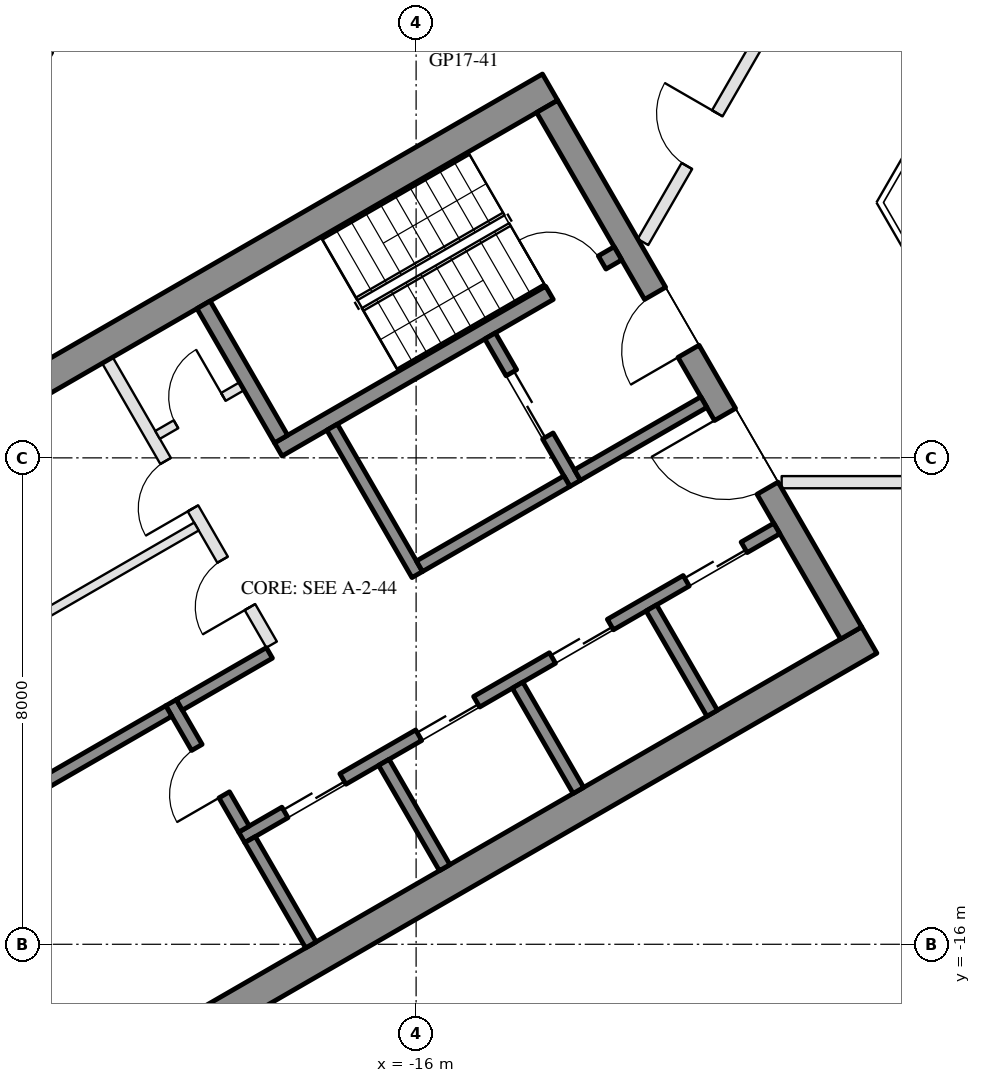
"""IFC4 building model, lengths in metres.
Left out: names, types, materials, properties, quantities, classifications, styles, units other than length and angle.
Written with IfcOpenShell. Run it as: python <this file> out.ifc"""

import sys

from ifc_helpers import new_model, si_unit, direction, frame, frame_2d, origin, place, context, subcontext, project, spatial, rectangle, extrude, element, fill, save


model = new_model("IFC4")
c1 = context("Model", 3, precision=1e-05, world=origin(), true_north=direction((0.0, 1.0)))
c2 = subcontext(c1, "Body", "Model", "MODEL_VIEW")
j1 = project(units=[si_unit("LENGTHUNIT", "METRE"), si_unit("PLANEANGLEUNIT", "RADIAN")], contexts=[c1])
p1 = place(None, origin())
s1 = spatial("IfcSite", under=j1, at=p1, CompositionType="ELEMENT")
p2 = place(p1, origin())
s2 = spatial("IfcBuilding", under=s1, at=p2, CompositionType="ELEMENT")
p3 = place(p2, frame((0.0, 0.0, 187.3)))
s3 = spatial("IfcBuildingStorey", under=s2, at=p3, CompositionType="ELEMENT", Elevation=187.3)
p4 = place(p3, frame((-20.309, 1.934, 0.0), z_axis=(0.0, 0.0, 1.0), x_axis=(-0.499992114976, -0.866029956157, 0.0)))
e1 = element("IfcWall", 1, at=p4, inside=s3, PredefinedType="SOLIDWALL", context=c2, shape_type="SweptSolid", body=[
    extrude(rectangle(XDim=6.74, YDim=0.35, at=frame_2d((3.37, 0.0))), origin(), (0.0, 0.0, 1.0), 3.55),
])
p5 = place(p4, frame((4.02, 0.0, 0.0)))
e2 = element("IfcOpeningElement", 2, at=p5, cuts=e1, PredefinedType="OPENING", context=c2, shape_type="SweptSolid", body=[
    extrude(rectangle(XDim=2.4, YDim=2.4, at=frame_2d((1.2, 1.2))), frame((0.0, 0.185, 0.0), z_axis=(0.0, -1.0, 0.0), x_axis=(1.0, 0.0, 0.0)), (0.0, 0.0, 1.0), 0.37),
])
p6 = place(p4, frame((0.77, 0.0, 0.3)))
e3 = element("IfcOpeningElement", 3, at=p6, cuts=e1, PredefinedType="OPENING", context=c2, shape_type="SweptSolid", body=[
    extrude(rectangle(XDim=2.9, YDim=2.65, at=frame_2d((1.45, 1.325))), frame((0.0, 0.185, 0.0), z_axis=(0.0, -1.0, 0.0), x_axis=(1.0, 0.0, 0.0)), (0.0, 0.0, 1.0), 0.37),
])
for number, where, z_axis, x_axis in (
    (4, (-13.797, -1.903, 0.0), (0.0, 0.0, 1.0), (-0.866, -0.5, 0.0)),
    (5, (-8.547, -10.997, 0.0), (0.0, 0.0, 1.0), (-0.866, -0.5, 0.0)),
):
    element("IfcWall", number, at=place(p3, frame(where, z_axis=z_axis, x_axis=x_axis)), inside=s3, PredefinedType="SHEAR", context=c2, shape_type="SweptSolid", body=[
        extrude(rectangle(XDim=14.837, YDim=0.5, at=frame_2d((7.418, 0.0))), origin(), (0.0, 0.0, 1.0), 3.5),
    ])
p7 = place(p3, frame((-13.845, -2.22, 0.0), z_axis=(0.0, 0.0, 1.0), x_axis=(0.500004234368, -0.866022959057, 0.0)))
e6 = element("IfcWall", 6, at=p7, inside=s3, PredefinedType="SHEAR", context=c2, shape_type="SweptSolid", body=[
    extrude(rectangle(XDim=10.0, YDim=0.4, at=frame_2d((5.0, 0.0))), origin(), (0.0, 0.0, 1.0), 3.5),
])
p8 = place(p7, frame((3.55, 0.0, 0.0)))
e7 = element("IfcOpeningElement", 7, at=p8, cuts=e6, PredefinedType="OPENING", context=c2, shape_type="SweptSolid", body=[
    extrude(rectangle(XDim=1.1, YDim=2.1, at=frame_2d((0.55, 1.05))), frame((0.0, 0.21, 0.0), z_axis=(0.0, -1.0, 0.0), x_axis=(1.0, 0.0, 0.0)), (0.0, 0.0, 1.0), 0.42),
])
p9 = place(p7, frame((5.85, 0.0, 0.0)))
e8 = element("IfcOpeningElement", 8, at=p9, cuts=e6, PredefinedType="OPENING", context=c2, shape_type="SweptSolid", body=[
    extrude(rectangle(XDim=1.4, YDim=2.1, at=frame_2d((0.7, 1.05))), frame((0.0, 0.21, 0.0), z_axis=(0.0, -1.0, 0.0), x_axis=(1.0, 0.0, 0.0)), (0.0, 0.0, 1.0), 0.42),
])
p10 = place(p3, frame((-12.681, -4.636, 0.0), z_axis=(0.0, 0.0, 1.0), x_axis=(-0.866021702275, -0.500006411147, 0.0)))
e9 = element("IfcWall", 9, at=p10, inside=s3, PredefinedType="SHEAR", context=c2, shape_type="SweptSolid", body=[
    extrude(rectangle(XDim=6.45, YDim=0.25, at=frame_2d((3.225, 0.0))), origin(), (0.0, 0.0, 1.0), 3.5),
])
p11 = place(p10, frame((0.3, 0.0, 0.0)))
e10 = element("IfcOpeningElement", 10, at=p11, cuts=e9, PredefinedType="OPENING", context=c2, shape_type="SweptSolid", body=[
    extrude(rectangle(XDim=1.0, YDim=2.1, at=frame_2d((0.5, 1.05))), frame((0.0, 0.135, 0.0), z_axis=(0.0, -1.0, 0.0), x_axis=(1.0, 0.0, 0.0)), (0.0, 0.0, 1.0), 0.27),
])
p12 = place(p3, frame((-19.496, -5.482, 0.0), z_axis=(0.0, 0.0, 1.0), x_axis=(0.499990435942, -0.866030925526, 0.0)))
e11 = element("IfcWall", 11, at=p12, inside=s3, PredefinedType="SHEAR", context=c2, shape_type="SweptSolid", body=[
    extrude(rectangle(XDim=2.55, YDim=0.25, at=frame_2d((1.275, 0.0))), origin(), (0.0, 0.0, 1.0), 3.5),
])
p13 = place(p3, frame((-17.381, -7.495, 0.0), z_axis=(0.0, 0.0, 1.0), x_axis=(0.500011755427, -0.866018616679, 0.0)))
e12 = element("IfcWall", 12, at=p13, inside=s3, PredefinedType="SHEAR", context=c2, shape_type="SweptSolid", body=[
    extrude(rectangle(XDim=2.8, YDim=0.2, at=frame_2d((1.4, 0.0))), origin(), (0.0, 0.0, 1.0), 3.5),
])
p14 = place(p3, frame((-14.783, -5.995, 0.0), z_axis=(0.0, 0.0, 1.0), x_axis=(0.49994636267, -0.866056369097, 0.0)))
e13 = element("IfcWall", 13, at=p14, inside=s3, PredefinedType="SHEAR", context=c2, shape_type="SweptSolid", body=[
    extrude(rectangle(XDim=2.8, YDim=0.2, at=frame_2d((1.4, 0.0))), origin(), (0.0, 0.0, 1.0), 3.5),
])
p15 = place(p14, frame((0.7, 0.0, 0.0)))
e14 = element("IfcOpeningElement", 14, at=p15, cuts=e13, PredefinedType="OPENING", context=c2, shape_type="SweptSolid", body=[
    extrude(rectangle(XDim=1.2, YDim=2.1, at=frame_2d((0.6, 1.05))), frame((0.0, 0.11, 0.0), z_axis=(0.0, -1.0, 0.0), x_axis=(1.0, 0.0, 0.0)), (0.0, 0.0, 1.0), 0.22),
])
p16 = place(p3, frame((-13.52, -8.383, 0.0), z_axis=(0.0, 0.0, 1.0), x_axis=(-0.866034573852, -0.49998411664, 0.0)))
e15 = element("IfcWall", 15, at=p16, inside=s3, PredefinedType="SHEAR", context=c2, shape_type="SweptSolid", body=[
    extrude(rectangle(XDim=2.8, YDim=0.2, at=frame_2d((1.4, 0.0))), origin(), (0.0, 0.0, 1.0), 3.5),
])
p17 = place(p3, frame((-11.268, -7.083, 0.0), z_axis=(0.0, 0.0, 1.0), x_axis=(-0.866050077142, -0.499957262057, 0.0)))
e16 = element("IfcWall", 16, at=p17, inside=s3, PredefinedType="SHEAR", context=c2, shape_type="SweptSolid", body=[
    extrude(rectangle(XDim=2.4, YDim=0.2, at=frame_2d((1.2, 0.0))), origin(), (0.0, 0.0, 1.0), 3.5),
])
p18 = place(p3, frame((-10.068, -9.162, 0.0), z_axis=(0.0, 0.0, 1.0), x_axis=(-0.866032725843, -0.499987317609, 0.0)))
e17 = element("IfcWall", 17, at=p18, inside=s3, PredefinedType="SHEAR", context=c2, shape_type="SweptSolid", body=[
    extrude(rectangle(XDim=10.16, YDim=0.2, at=frame_2d((5.08, 0.0))), origin(), (0.0, 0.0, 1.0), 3.5),
])
p19 = place(p18, frame((0.62, 0.0, 0.0)))
e18 = element("IfcOpeningElement", 18, at=p19, cuts=e17, PredefinedType="OPENING", context=c2, shape_type="SweptSolid", body=[
    extrude(rectangle(XDim=1.1, YDim=2.1, at=frame_2d((0.55, 1.05))), frame((0.0, 0.11, 0.0), z_axis=(0.0, -1.0, 0.0), x_axis=(1.0, 0.0, 0.0)), (0.0, 0.0, 1.0), 0.22),
])
p20 = place(p18, frame((3.16, 0.0, 0.0)))
e19 = element("IfcOpeningElement", 19, at=p20, cuts=e17, PredefinedType="OPENING", context=c2, shape_type="SweptSolid", body=[
    extrude(rectangle(XDim=1.1, YDim=2.1, at=frame_2d((0.55, 1.05))), frame((0.0, 0.11, 0.0), z_axis=(0.0, -1.0, 0.0), x_axis=(1.0, 0.0, 0.0)), (0.0, 0.0, 1.0), 0.22),
])
p21 = place(p18, frame((5.7, 0.0, 0.0)))
e20 = element("IfcOpeningElement", 20, at=p21, cuts=e17, PredefinedType="OPENING", context=c2, shape_type="SweptSolid", body=[
    extrude(rectangle(XDim=1.1, YDim=2.1, at=frame_2d((0.55, 1.05))), frame((0.0, 0.11, 0.0), z_axis=(0.0, -1.0, 0.0), x_axis=(1.0, 0.0, 0.0)), (0.0, 0.0, 1.0), 0.22),
])
p22 = place(p18, frame((8.24, 0.0, 0.0)))
e21 = element("IfcOpeningElement", 21, at=p22, cuts=e17, PredefinedType="OPENING", context=c2, shape_type="SweptSolid", body=[
    extrude(rectangle(XDim=1.1, YDim=2.1, at=frame_2d((0.55, 1.05))), frame((0.0, 0.11, 0.0), z_axis=(0.0, -1.0, 0.0), x_axis=(1.0, 0.0, 0.0)), (0.0, 0.0, 1.0), 0.22),
])
p23 = place(p3, frame((-20.031, -12.026, 0.0), z_axis=(0.0, 0.0, 1.0), x_axis=(0.500033551112, -0.866006032174, 0.0)))
e22 = element("IfcWall", 22, at=p23, inside=s3, PredefinedType="SHEAR", context=c2, shape_type="SweptSolid", body=[
    extrude(rectangle(XDim=2.4, YDim=0.2, at=frame_2d((1.2, 0.0))), origin(), (0.0, 0.0, 1.0), 3.5),
])
p24 = place(p23, frame((0.85, 0.0, 0.0)))
e23 = element("IfcOpeningElement", 23, at=p24, cuts=e22, PredefinedType="OPENING", context=c2, shape_type="SweptSolid", body=[
    extrude(rectangle(XDim=0.9, YDim=2.1, at=frame_2d((0.45, 1.05))), frame((0.0, 0.11, 0.0), z_axis=(0.0, -1.0, 0.0), x_axis=(1.0, 0.0, 0.0)), (0.0, 0.0, 1.0), 0.22),
])
p25 = place(p3, frame((-18.413, -11.208, 0.0), z_axis=(0.0, 0.0, 1.0), x_axis=(-0.866038183914, -0.499977863513, 0.0)))
e24 = element("IfcWall", 24, at=p25, inside=s3, PredefinedType="SHEAR", context=c2, shape_type="SweptSolid", body=[
    extrude(rectangle(XDim=1.71, YDim=0.2, at=frame_2d((0.855, 0.0))), origin(), (0.0, 0.0, 1.0), 3.5),
])
for number, where, z_axis, x_axis in (
    (25, (-12.131, -10.468, 0.0), (0.0, 0.0, 1.0), (0.5, -0.866, 0.0)),
    (26, (-14.331, -11.738, 0.0), (0.0, 0.0, 1.0), (0.5, -0.866, 0.0)),
    (27, (-16.531, -13.008, 0.0), (0.0, 0.0, 1.0), (0.5, -0.866, 0.0)),
    (28, (-18.73, -14.278, 0.0), (0.0, 0.0, 1.0), (0.5, -0.866, 0.0)),
):
    element("IfcWall", number, at=place(p3, frame(where, z_axis=z_axis, x_axis=x_axis)), inside=s3, PredefinedType="SHEAR", context=c2, shape_type="SweptSolid", body=[
        extrude(rectangle(XDim=2.0, YDim=0.2, at=frame_2d((1.0, 0.0))), origin(), (0.0, 0.0, 1.0), 3.5),
    ])
p26 = place(p3, frame((-20.067, -12.163, 0.0), z_axis=(0.0, 0.0, 1.0), x_axis=(-0.866055327414, -0.49994816717, 0.0)))
e29 = element("IfcWall", 29, at=p26, inside=s3, PredefinedType="SHEAR", context=c2, shape_type="SweptSolid", body=[
    extrude(rectangle(XDim=2.84, YDim=0.2, at=frame_2d((1.42, 0.0))), origin(), (0.0, 0.0, 1.0), 3.5),
])
p27 = place(p3, frame((-21.076, -6.395, 0.0), z_axis=(0.0, 0.0, 1.0), x_axis=(0.50001468107, -0.866016927499, 0.0)))
e30 = element("IfcWall", 30, at=p27, inside=s3, PredefinedType="PARTITIONING", context=c2, shape_type="SweptSolid", body=[
    extrude(rectangle(XDim=5.4, YDim=0.2, at=frame_2d((2.7, 0.0))), origin(), (0.0, 0.0, 1.0), 3.5),
])
p28 = place(p27, frame((1.913, 0.0, 0.0)))
e31 = element("IfcOpeningElement", 31, at=p28, cuts=e30, PredefinedType="OPENING", context=c2, shape_type="SweptSolid", body=[
    extrude(rectangle(XDim=0.9, YDim=2.1, at=frame_2d((0.45, 1.05))), frame((0.0, 0.11, 0.0), z_axis=(0.0, -1.0, 0.0), x_axis=(1.0, 0.0, 0.0)), (0.0, 0.0, 1.0), 0.22),
])
p29 = place(p27, frame((3.788, 0.0, 0.0)))
e32 = element("IfcOpeningElement", 32, at=p29, cuts=e30, PredefinedType="OPENING", context=c2, shape_type="SweptSolid", body=[
    extrude(rectangle(XDim=0.9, YDim=2.1, at=frame_2d((0.45, 1.05))), frame((0.0, 0.11, 0.0), z_axis=(0.0, -1.0, 0.0), x_axis=(1.0, 0.0, 0.0)), (0.0, 0.0, 1.0), 0.22),
])
p30 = place(p3, frame((-18.866, -6.822, 0.0), z_axis=(0.0, 0.0, 1.0), x_axis=(-0.866028054938, -0.499995408039, 0.0)))
e33 = element("IfcWall", 33, at=p30, inside=s3, PredefinedType="PARTITIONING", context=c2, shape_type="SweptSolid", body=[
    extrude(rectangle(XDim=1.6, YDim=0.15, at=frame_2d((0.8, 0.0))), origin(), (0.0, 0.0, 1.0), 3.5),
])
p31 = place(p30, frame((0.35, 0.0, 0.0)))
e34 = element("IfcOpeningElement", 34, at=p31, cuts=e33, PredefinedType="OPENING", context=c2, shape_type="SweptSolid", body=[
    extrude(rectangle(XDim=0.9, YDim=2.1, at=frame_2d((0.45, 1.05))), frame((0.0, 0.085, 0.0), z_axis=(0.0, -1.0, 0.0), x_axis=(1.0, 0.0, 0.0)), (0.0, 0.0, 1.0), 0.17),
])
p32 = place(p3, frame((-19.613, -9.13, 0.0), z_axis=(0.0, 0.0, 1.0), x_axis=(-0.866031734426, -0.499989034847, 0.0)))
e35 = element("IfcWall", 35, at=p32, inside=s3, PredefinedType="PARTITIONING", context=c2, shape_type="SweptSolid", body=[
    extrude(rectangle(XDim=6.95, YDim=0.15, at=frame_2d((3.475, 0.0))), origin(), (0.0, 0.0, 1.0), 3.5),
])
p33 = place(p3, frame((-3.803, -8.4, 0.0), z_axis=(0.0, 0.0, 1.0), x_axis=(-1.0, 0.0, 0.0)))
e36 = element("IfcWall", 36, at=p33, inside=s3, PredefinedType="PARTITIONING", context=c2, shape_type="SweptSolid", body=[
    extrude(rectangle(XDim=6.185, YDim=0.2, at=frame_2d((3.092, 0.0))), origin(), (0.0, 0.0, 1.0), 2.95),
])
p34 = place(p33, frame((2.592, 0.0, 0.0)))
e37 = element("IfcOpeningElement", 37, at=p34, cuts=e36, PredefinedType="OPENING", context=c2, shape_type="SweptSolid", body=[
    extrude(rectangle(XDim=1.0, YDim=2.1, at=frame_2d((0.5, 1.05))), frame((0.0, 0.11, 0.0), z_axis=(0.0, -1.0, 0.0), x_axis=(1.0, 0.0, 0.0)), (0.0, 0.0, 1.0), 0.22),
])
p35 = place(p3, frame((-12.269, -4.45, 0.0), z_axis=(0.0, 0.0, 1.0), x_axis=(0.500008716408, 0.866020371305, 0.0)))
e38 = element("IfcWall", 38, at=p35, inside=s3, PredefinedType="PARTITIONING", context=c2, shape_type="SweptSolid", body=[
    extrude(rectangle(XDim=3.888, YDim=0.2, at=frame_2d((1.944, 0.0))), origin(), (0.0, 0.0, 1.0), 2.95),
])
p36 = place(p35, frame((1.444, 0.0, 0.0)))
e39 = element("IfcOpeningElement", 39, at=p36, cuts=e38, PredefinedType="OPENING", context=c2, shape_type="SweptSolid", body=[
    extrude(rectangle(XDim=1.0, YDim=2.1, at=frame_2d((0.5, 1.05))), frame((0.0, 0.11, 0.0), z_axis=(0.0, -1.0, 0.0), x_axis=(1.0, 0.0, 0.0)), (0.0, 0.0, 1.0), 0.22),
])
p37 = place(p15, origin())
e40 = element("IfcDoor", 40, at=p37, inside=s3, OperationType="DOUBLE_DOOR_SLIDING", PredefinedType="DOOR", context=c2, shape_type="SweptSolid", body=[
    extrude(rectangle(XDim=1.2, YDim=2.1, at=frame_2d((0.6, 1.05))), frame((0.0, 0.025, 0.0), z_axis=(0.0, -1.0, 0.0), x_axis=(1.0, 0.0, 0.0)), (0.0, 0.0, 1.0), 0.05),
])
fill(e14, e40)
p38 = place(p31, frame((0.9, 0.0, 0.0), z_axis=(0.0, 0.0, 1.0), x_axis=(-1.0, 0.0, 0.0)))
e41 = element("IfcDoor", 41, at=p38, inside=s3, OperationType="SINGLE_SWING_RIGHT", PredefinedType="DOOR", context=c2, shape_type="SweptSolid", body=[
    extrude(rectangle(XDim=0.9, YDim=2.1, at=frame_2d((0.45, 1.05))), frame((0.0, 0.025, 0.0), z_axis=(0.0, -1.0, 0.0), x_axis=(1.0, 0.0, 0.0)), (0.0, 0.0, 1.0), 0.05),
])
fill(e34, e41)
p39 = place(p19, origin())
e42 = element("IfcDoor", 42, at=p39, inside=s3, OperationType="DOUBLE_DOOR_SLIDING", PredefinedType="DOOR", context=c2, shape_type="SweptSolid", body=[
    extrude(rectangle(XDim=1.1, YDim=2.1, at=frame_2d((0.55, 1.05))), frame((0.0, 0.025, 0.0), z_axis=(0.0, -1.0, 0.0), x_axis=(1.0, 0.0, 0.0)), (0.0, 0.0, 1.0), 0.05),
])
fill(e18, e42)
p40 = place(p20, origin())
e43 = element("IfcDoor", 43, at=p40, inside=s3, OperationType="DOUBLE_DOOR_SLIDING", PredefinedType="DOOR", context=c2, shape_type="SweptSolid", body=[
    extrude(rectangle(XDim=1.1, YDim=2.1, at=frame_2d((0.55, 1.05))), frame((0.0, 0.025, 0.0), z_axis=(0.0, -1.0, 0.0), x_axis=(1.0, 0.0, 0.0)), (0.0, 0.0, 1.0), 0.05),
])
fill(e19, e43)
p41 = place(p21, origin())
e44 = element("IfcDoor", 44, at=p41, inside=s3, OperationType="DOUBLE_DOOR_SLIDING", PredefinedType="DOOR", context=c2, shape_type="SweptSolid", body=[
    extrude(rectangle(XDim=1.1, YDim=2.1, at=frame_2d((0.55, 1.05))), frame((0.0, 0.025, 0.0), z_axis=(0.0, -1.0, 0.0), x_axis=(1.0, 0.0, 0.0)), (0.0, 0.0, 1.0), 0.05),
])
fill(e20, e44)
p42 = place(p22, origin())
e45 = element("IfcDoor", 45, at=p42, inside=s3, OperationType="DOUBLE_DOOR_SLIDING", PredefinedType="DOOR", context=c2, shape_type="SweptSolid", body=[
    extrude(rectangle(XDim=1.1, YDim=2.1, at=frame_2d((0.55, 1.05))), frame((0.0, 0.025, 0.0), z_axis=(0.0, -1.0, 0.0), x_axis=(1.0, 0.0, 0.0)), (0.0, 0.0, 1.0), 0.05),
])
fill(e21, e45)
p43 = place(p24, frame((0.9, 0.0, 0.0), z_axis=(0.0, 0.0, 1.0), x_axis=(-1.0, 0.0, 0.0)))
e46 = element("IfcDoor", 46, at=p43, inside=s3, OperationType="SINGLE_SWING_LEFT", PredefinedType="DOOR", context=c2, shape_type="SweptSolid", body=[
    extrude(rectangle(XDim=0.9, YDim=2.1, at=frame_2d((0.45, 1.05))), frame((0.0, 0.025, 0.0), z_axis=(0.0, -1.0, 0.0), x_axis=(1.0, 0.0, 0.0)), (0.0, 0.0, 1.0), 0.05),
])
fill(e23, e46)
p44 = place(p28, frame((0.9, 0.0, 0.0), z_axis=(0.0, 0.0, 1.0), x_axis=(-1.0, 0.0, 0.0)))
e47 = element("IfcDoor", 47, at=p44, inside=s3, OperationType="SINGLE_SWING_LEFT", PredefinedType="DOOR", context=c2, shape_type="SweptSolid", body=[
    extrude(rectangle(XDim=0.9, YDim=2.1, at=frame_2d((0.45, 1.05))), frame((0.0, 0.025, 0.0), z_axis=(0.0, -1.0, 0.0), x_axis=(1.0, 0.0, 0.0)), (0.0, 0.0, 1.0), 0.05),
])
fill(e31, e47)
p45 = place(p29, frame((0.9, 0.0, 0.0), z_axis=(0.0, 0.0, 1.0), x_axis=(-1.0, 0.0, 0.0)))
e48 = element("IfcDoor", 48, at=p45, inside=s3, OperationType="SINGLE_SWING_LEFT", PredefinedType="DOOR", context=c2, shape_type="SweptSolid", body=[
    extrude(rectangle(XDim=0.9, YDim=2.1, at=frame_2d((0.45, 1.05))), frame((0.0, 0.025, 0.0), z_axis=(0.0, -1.0, 0.0), x_axis=(1.0, 0.0, 0.0)), (0.0, 0.0, 1.0), 0.05),
])
fill(e32, e48)
p46 = place(p8, frame((1.1, 0.0, 0.0), z_axis=(0.0, 0.0, 1.0), x_axis=(-1.0, 0.0, 0.0)))
e49 = element("IfcDoor", 49, at=p46, inside=s3, OperationType="SINGLE_SWING_LEFT", PredefinedType="DOOR", context=c2, shape_type="SweptSolid", body=[
    extrude(rectangle(XDim=1.1, YDim=2.1, at=frame_2d((0.55, 1.05))), frame((0.0, 0.025, 0.0), z_axis=(0.0, -1.0, 0.0), x_axis=(1.0, 0.0, 0.0)), (0.0, 0.0, 1.0), 0.05),
])
fill(e7, e49)
p47 = place(p9, frame((1.4, 0.0, 0.0), z_axis=(0.0, 0.0, 1.0), x_axis=(-1.0, 0.0, 0.0)))
e50 = element("IfcDoor", 50, at=p47, inside=s3, OperationType="DOUBLE_DOOR_SINGLE_SWING", PredefinedType="DOOR", context=c2, shape_type="SweptSolid", body=[
    extrude(rectangle(XDim=1.4, YDim=2.1, at=frame_2d((0.7, 1.05))), frame((0.0, 0.025, 0.0), z_axis=(0.0, -1.0, 0.0), x_axis=(1.0, 0.0, 0.0)), (0.0, 0.0, 1.0), 0.05),
])
fill(e8, e50)
p48 = place(p11, frame((1.0, 0.0, 0.0), z_axis=(0.0, 0.0, 1.0), x_axis=(-1.0, 0.0, 0.0)))
e51 = element("IfcDoor", 51, at=p48, inside=s3, OperationType="SINGLE_SWING_LEFT", PredefinedType="DOOR", context=c2, shape_type="SweptSolid", body=[
    extrude(rectangle(XDim=1.0, YDim=2.1, at=frame_2d((0.5, 1.05))), frame((0.0, 0.025, 0.0), z_axis=(0.0, -1.0, 0.0), x_axis=(1.0, 0.0, 0.0)), (0.0, 0.0, 1.0), 0.05),
])
fill(e10, e51)
p49 = place(p36, origin())
e52 = element("IfcDoor", 52, at=p49, inside=s3, OperationType="SINGLE_SWING_RIGHT", PredefinedType="DOOR", context=c2, shape_type="SweptSolid", body=[
    extrude(rectangle(XDim=1.0, YDim=2.1, at=frame_2d((0.5, 1.05))), frame((0.0, 0.025, 0.0), z_axis=(0.0, -1.0, 0.0), x_axis=(1.0, 0.0, 0.0)), (0.0, 0.0, 1.0), 0.05),
])
fill(e39, e52)
save(model, sys.argv[1])
